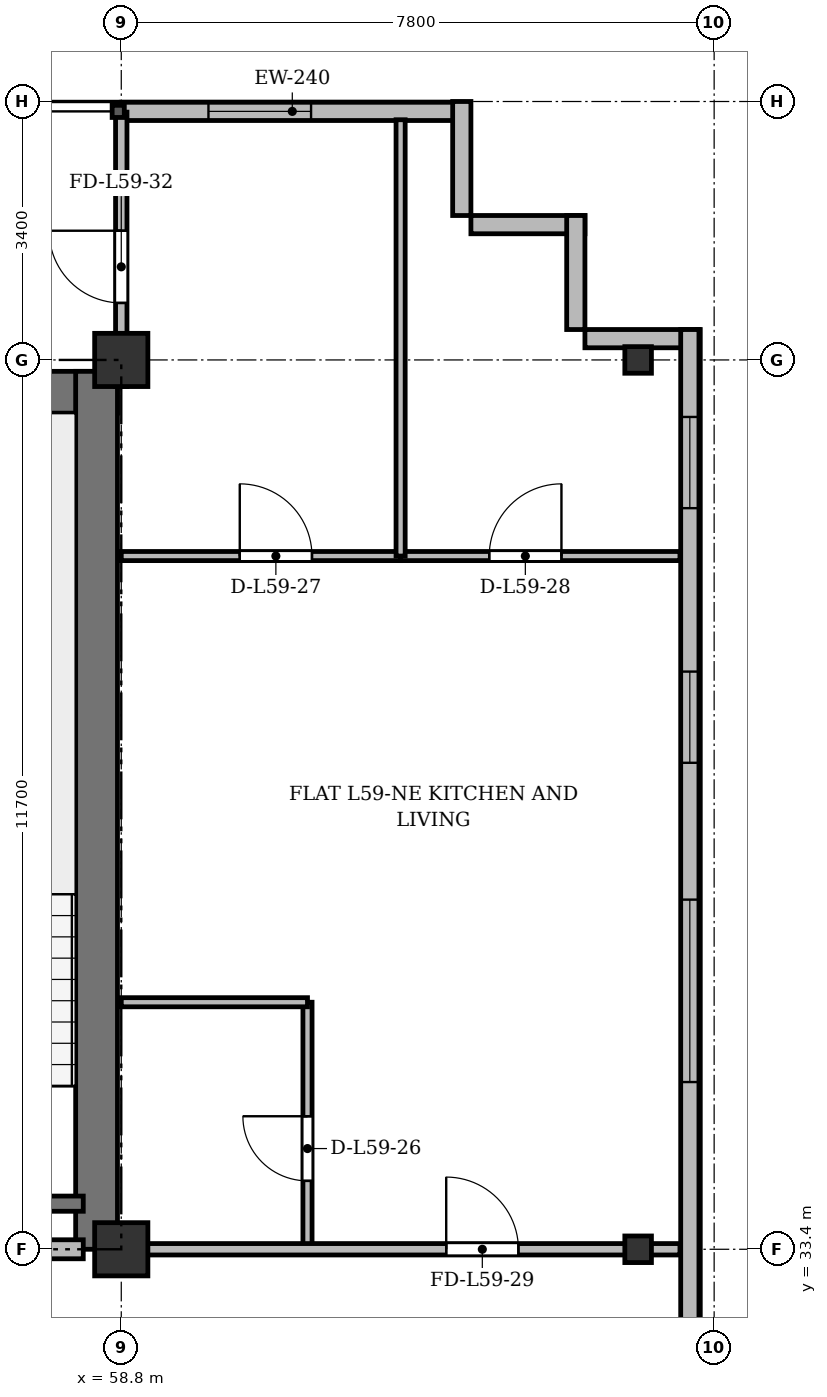
"""IFC4 building model, lengths in metres.
Left out: names, types, materials, properties, quantities, classifications, styles, units other than length and angle.
Written with IfcOpenShell. Run it as: python <this file> out.ifc"""

import sys

from ifc_helpers import new_model, si_unit, direction, frame, frame_2d, origin, origin_2d, place, context, subcontext, project, spatial, rectangle, i_section, extrude, source, transform, mapped, element, fill, save


model = new_model("IFC4")
c1 = context("Model", 3, precision=1e-05, world=origin(), true_north=direction((0.0, 1.0)))
c2 = subcontext(c1, "Body", "Model", "MODEL_VIEW")
j1 = project(units=[si_unit("LENGTHUNIT", "METRE"), si_unit("PLANEANGLEUNIT", "RADIAN")], contexts=[c1])
p1 = place(None, origin())
s1 = spatial("IfcSite", under=j1, at=p1, CompositionType="ELEMENT")
p2 = place(p1, origin())
s2 = spatial("IfcBuilding", under=s1, at=p2, CompositionType="ELEMENT")
p3 = place(p2, frame((0.0, 0.0, 226.5)))
s3 = spatial("IfcBuildingStorey", under=s2, at=p3, CompositionType="ELEMENT", Elevation=226.5)
m1 = source(origin(), c2, "Body", "SweptSolid", [
    extrude(rectangle(XDim=0.7, YDim=0.7, at=origin_2d()), origin(), (0.0, 0.0, 1.0), 3.6),
])
for number, where, z_axis, x_axis in (
    (1, (58.8, 33.4, 0.0), (0.0, 0.0, 1.0), (1.0, 0.0, 0.0)),
    (2, (58.8, 45.1, 0.0), (0.0, 0.0, 1.0), (1.0, 0.0, 0.0)),
):
    element("IfcColumn", number, at=place(p3, frame(where, z_axis=z_axis, x_axis=x_axis)), inside=s3, PredefinedType="COLUMN", context=c2, shape_type="MappedRepresentation", body=[
        mapped(m1, transform((0.0, 0.0, 0.0), x_axis=(1.0, 0.0, 0.0), y_axis=(0.0, 1.0, 0.0), z_axis=(0.0, 0.0, 1.0), scale=1.0)),
    ])
m2 = source(origin(), c2, "Body", "SweptSolid", [
    extrude(i_section(OverallWidth=0.35, OverallDepth=0.35, WebThickness=0.018, FlangeThickness=0.028, at=origin_2d()), origin(), (0.0, 0.0, 1.0), 3.6),
])
for number, where, z_axis, x_axis in (
    (3, (65.6, 33.4, 0.0), (0.0, 0.0, 1.0), (1.0, 0.0, 0.0)),
    (4, (65.6, 45.1, 0.0), (0.0, 0.0, 1.0), (1.0, 0.0, 0.0)),
):
    element("IfcColumn", number, at=place(p3, frame(where, z_axis=z_axis, x_axis=x_axis)), inside=s3, PredefinedType="COLUMN", context=c2, shape_type="MappedRepresentation", body=[
        mapped(m2, transform((0.0, 0.0, 0.0), x_axis=(1.0, 0.0, 0.0), y_axis=(0.0, 1.0, 0.0), z_axis=(0.0, 0.0, 1.0), scale=1.0)),
    ])
p4 = place(p3, frame((58.8, 48.37, 0.0), z_axis=(0.0, 0.0, 1.0), x_axis=(1.0, 0.0, 0.0)))
e5 = element("IfcWall", 5, at=p4, inside=s3, PredefinedType="SOLIDWALL", context=c2, shape_type="SweptSolid", body=[
    extrude(rectangle(XDim=4.5, YDim=0.24, at=frame_2d((2.25, 0.0))), origin(), (0.0, 0.0, 1.0), 3.36),
])
p5 = place(p4, frame((1.147, 0.0, 0.9)))
e6 = element("IfcOpeningElement", 6, at=p5, cuts=e5, PredefinedType="OPENING", context=c2, shape_type="SweptSolid", body=[
    extrude(rectangle(XDim=1.35, YDim=1.5, at=frame_2d((0.675, 0.75))), frame((0.0, 0.13, 0.0), z_axis=(0.0, -1.0, 0.0), x_axis=(1.0, 0.0, 0.0)), (0.0, 0.0, 1.0), 0.26),
])
for number, where, z_axis, x_axis in (
    (7, (63.28, 48.5, 0.0), (0.0, 0.0, 1.0), (0.0, -1.0, 0.0)),
    (8, (63.4, 46.88, 0.0), (0.0, 0.0, 1.0), (1.0, 0.0, 0.0)),
    (9, (64.78, 47.0, 0.0), (0.0, 0.0, 1.0), (0.0, -1.0, 0.0)),
    (10, (64.9, 45.38, 0.0), (0.0, 0.0, 1.0), (1.0, 0.0, 0.0)),
):
    element("IfcWall", number, at=place(p3, frame(where, z_axis=z_axis, x_axis=x_axis)), inside=s3, PredefinedType="SOLIDWALL", context=c2, shape_type="SweptSolid", body=[
        extrude(rectangle(XDim=1.5, YDim=0.24, at=frame_2d((0.75, 0.0))), origin(), (0.0, 0.0, 1.0), 3.36),
    ])
p6 = place(p3, frame((66.28, 45.5, 0.0), z_axis=(0.0, 0.0, 1.0), x_axis=(0.0, -1.0, 0.0)))
e11 = element("IfcWall", 11, at=p6, inside=s3, PredefinedType="SOLIDWALL", context=c2, shape_type="SweptSolid", body=[
    extrude(rectangle(XDim=39.1, YDim=0.24, at=frame_2d((19.55, 0.0))), origin(), (0.0, 0.0, 1.0), 3.36),
])
p7 = place(p6, frame((36.45, 0.0, 0.92)))
e12 = element("IfcOpeningElement", 12, at=p7, cuts=e11, PredefinedType="OPENING", context=c2, shape_type="SweptSolid", body=[
    extrude(rectangle(XDim=1.2, YDim=1.65, at=frame_2d((0.6, 0.825))), frame((0.0, 0.13, 0.0), z_axis=(0.0, -1.0, 0.0), x_axis=(1.0, 0.0, 0.0)), (0.0, 0.0, 1.0), 0.26),
])
p8 = place(p6, frame((32.9, 0.0, 0.92)))
e13 = element("IfcOpeningElement", 13, at=p8, cuts=e11, PredefinedType="OPENING", context=c2, shape_type="SweptSolid", body=[
    extrude(rectangle(XDim=2.4, YDim=2.1, at=frame_2d((1.2, 1.05))), frame((0.0, 0.13, 0.0), z_axis=(0.0, -1.0, 0.0), x_axis=(1.0, 0.0, 0.0)), (0.0, 0.0, 1.0), 0.26),
])
p9 = place(p6, frame((28.7, 0.0, 0.92)))
e14 = element("IfcOpeningElement", 14, at=p9, cuts=e11, PredefinedType="OPENING", context=c2, shape_type="SweptSolid", body=[
    extrude(rectangle(XDim=2.4, YDim=2.1, at=frame_2d((1.2, 1.05))), frame((0.0, 0.13, 0.0), z_axis=(0.0, -1.0, 0.0), x_axis=(1.0, 0.0, 0.0)), (0.0, 0.0, 1.0), 0.26),
])
p10 = place(p6, frame((21.5, 0.0, 0.92)))
e15 = element("IfcOpeningElement", 15, at=p10, cuts=e11, PredefinedType="OPENING", context=c2, shape_type="SweptSolid", body=[
    extrude(rectangle(XDim=2.4, YDim=2.1, at=frame_2d((1.2, 1.05))), frame((0.0, 0.13, 0.0), z_axis=(0.0, -1.0, 0.0), x_axis=(1.0, 0.0, 0.0)), (0.0, 0.0, 1.0), 0.26),
])
p11 = place(p6, frame((7.5, 0.0, 0.92)))
e16 = element("IfcOpeningElement", 16, at=p11, cuts=e11, PredefinedType="OPENING", context=c2, shape_type="SweptSolid", body=[
    extrude(rectangle(XDim=2.4, YDim=2.1, at=frame_2d((1.2, 1.05))), frame((0.0, 0.13, 0.0), z_axis=(0.0, -1.0, 0.0), x_axis=(1.0, 0.0, 0.0)), (0.0, 0.0, 1.0), 0.26),
])
p12 = place(p6, frame((4.5, 0.0, 0.92)))
e17 = element("IfcOpeningElement", 17, at=p12, cuts=e11, PredefinedType="OPENING", context=c2, shape_type="SweptSolid", body=[
    extrude(rectangle(XDim=1.2, YDim=1.65, at=frame_2d((0.6, 0.825))), frame((0.0, 0.13, 0.0), z_axis=(0.0, -1.0, 0.0), x_axis=(1.0, 0.0, 0.0)), (0.0, 0.0, 1.0), 0.26),
])
p13 = place(p6, frame((1.15, 0.0, 0.92)))
e18 = element("IfcOpeningElement", 18, at=p13, cuts=e11, PredefinedType="OPENING", context=c2, shape_type="SweptSolid", body=[
    extrude(rectangle(XDim=1.2, YDim=1.65, at=frame_2d((0.6, 0.825))), frame((0.0, 0.13, 0.0), z_axis=(0.0, -1.0, 0.0), x_axis=(1.0, 0.0, 0.0)), (0.0, 0.0, 1.0), 0.26),
])
p14 = place(p3, frame((15.65, 44.675, 0.0), z_axis=(0.0, 0.0, 1.0), x_axis=(1.0, 0.0, 0.0)))
e19 = element("IfcWall", 19, at=p14, inside=s3, PredefinedType="SHEAR", context=c2, shape_type="SweptSolid", body=[
    extrude(rectangle(XDim=43.1, YDim=0.55, at=frame_2d((21.55, 0.0))), origin(), (0.0, 0.0, 1.0), 3.36),
])
p15 = place(p3, frame((58.475, 33.4, 0.0), z_axis=(0.0, 0.0, 1.0), x_axis=(0.0, 1.0, 0.0)))
e20 = element("IfcWall", 20, at=p15, inside=s3, PredefinedType="SHEAR", context=c2, shape_type="SweptSolid", body=[
    extrude(rectangle(XDim=11.55, YDim=0.55, at=frame_2d((5.775, 0.0))), origin(), (0.0, 0.0, 1.0), 3.36),
])
p16 = place(p3, frame((54.9, 34.0, 0.0), z_axis=(0.0, 0.0, 1.0), x_axis=(1.0, 0.0, 0.0)))
e21 = element("IfcWall", 21, at=p16, inside=s3, PredefinedType="SHEAR", context=c2, shape_type="SweptSolid", body=[
    extrude(rectangle(XDim=3.4, YDim=0.2, at=frame_2d((1.7, 0.0))), origin(), (0.0, 0.0, 1.0), 3.36),
])
p17 = place(p3, frame((47.15, 33.4, 0.0), z_axis=(0.0, 0.0, 1.0), x_axis=(1.0, 0.0, 0.0)))
e22 = element("IfcWall", 22, at=p17, inside=s3, PredefinedType="PARTITIONING", context=c2, shape_type="SweptSolid", body=[
    extrude(rectangle(XDim=11.15, YDim=0.25, at=frame_2d((5.575, 0.0))), origin(), (0.0, 0.0, 1.0), 2.91),
])
p18 = place(p17, frame((0.7, 0.0, 0.0)))
e23 = element("IfcOpeningElement", 23, at=p18, cuts=e22, PredefinedType="OPENING", context=c2, shape_type="SweptSolid", body=[
    extrude(rectangle(XDim=0.95, YDim=2.15, at=frame_2d((0.475, 1.075))), frame((0.0, 0.135, 0.0), z_axis=(0.0, -1.0, 0.0), x_axis=(1.0, 0.0, 0.0)), (0.0, 0.0, 1.0), 0.27),
])
p19 = place(p17, frame((6.0, 0.0, 0.0)))
e24 = element("IfcOpeningElement", 24, at=p19, cuts=e22, PredefinedType="OPENING", context=c2, shape_type="SweptSolid", body=[
    extrude(rectangle(XDim=1.2, YDim=2.15, at=frame_2d((0.6, 1.075))), frame((0.0, 0.135, 0.0), z_axis=(0.0, -1.0, 0.0), x_axis=(1.0, 0.0, 0.0)), (0.0, 0.0, 1.0), 0.27),
])
p20 = place(p3, frame((61.25, 33.4, 0.0), z_axis=(0.0, 0.0, 1.0), x_axis=(0.0, 1.0, 0.0)))
e25 = element("IfcWall", 25, at=p20, inside=s3, PredefinedType="PARTITIONING", context=c2, shape_type="SweptSolid", body=[
    extrude(rectangle(XDim=3.25, YDim=0.12, at=frame_2d((1.625, 0.0))), origin(), (0.0, 0.0, 1.0), 2.91),
])
p21 = place(p20, frame((0.9, 0.0, 0.0)))
e26 = element("IfcOpeningElement", 26, at=p21, cuts=e25, PredefinedType="OPENING", context=c2, shape_type="SweptSolid", body=[
    extrude(rectangle(XDim=0.85, YDim=2.1, at=frame_2d((0.425, 1.05))), frame((0.0, 0.07, 0.0), z_axis=(0.0, -1.0, 0.0), x_axis=(1.0, 0.0, 0.0)), (0.0, 0.0, 1.0), 0.14),
])
p22 = place(p3, frame((58.8, 36.65, 0.0), z_axis=(0.0, 0.0, 1.0), x_axis=(1.0, 0.0, 0.0)))
e27 = element("IfcWall", 27, at=p22, inside=s3, PredefinedType="PARTITIONING", context=c2, shape_type="SweptSolid", body=[
    extrude(rectangle(XDim=2.45, YDim=0.12, at=frame_2d((1.225, 0.0))), origin(), (0.0, 0.0, 1.0), 2.86),
])
p23 = place(p3, frame((58.8, 42.52, 0.0), z_axis=(0.0, 0.0, 1.0), x_axis=(1.0, 0.0, 0.0)))
e28 = element("IfcWall", 28, at=p23, inside=s3, PredefinedType="PARTITIONING", context=c2, shape_type="SweptSolid", body=[
    extrude(rectangle(XDim=3.675, YDim=0.12, at=frame_2d((1.837, 0.0))), origin(), (0.0, 0.0, 1.0), 2.86),
])
p24 = place(p23, frame((1.559, 0.0, 0.0)))
e29 = element("IfcOpeningElement", 29, at=p24, cuts=e28, PredefinedType="OPENING", context=c2, shape_type="SweptSolid", body=[
    extrude(rectangle(XDim=0.95, YDim=2.15, at=frame_2d((0.475, 1.075))), frame((0.0, 0.07, 0.0), z_axis=(0.0, -1.0, 0.0), x_axis=(1.0, 0.0, 0.0)), (0.0, 0.0, 1.0), 0.14),
])
p25 = place(p3, frame((62.475, 42.52, 0.0), z_axis=(0.0, 0.0, 1.0), x_axis=(1.0, 0.0, 0.0)))
e30 = element("IfcWall", 30, at=p25, inside=s3, PredefinedType="PARTITIONING", context=c2, shape_type="SweptSolid", body=[
    extrude(rectangle(XDim=3.675, YDim=0.12, at=frame_2d((1.837, 0.0))), origin(), (0.0, 0.0, 1.0), 2.86),
])
p26 = place(p25, frame((1.166, 0.0, 0.0)))
e31 = element("IfcOpeningElement", 31, at=p26, cuts=e30, PredefinedType="OPENING", context=c2, shape_type="SweptSolid", body=[
    extrude(rectangle(XDim=0.95, YDim=2.15, at=frame_2d((0.475, 1.075))), frame((0.0, 0.07, 0.0), z_axis=(0.0, -1.0, 0.0), x_axis=(1.0, 0.0, 0.0)), (0.0, 0.0, 1.0), 0.14),
])
p27 = place(p3, frame((62.475, 42.52, 0.0), z_axis=(0.0, 0.0, 1.0), x_axis=(0.0, 1.0, 0.0)))
e32 = element("IfcWall", 32, at=p27, inside=s3, PredefinedType="PARTITIONING", context=c2, shape_type="SweptSolid", body=[
    extrude(rectangle(XDim=5.74, YDim=0.12, at=frame_2d((2.87, 0.0))), origin(), (0.0, 0.0, 1.0), 2.91),
])
p28 = place(p3, frame((58.8, 33.4, 0.0), z_axis=(0.0, 0.0, 1.0), x_axis=(1.0, 0.0, 0.0)))
e33 = element("IfcWall", 33, at=p28, inside=s3, PredefinedType="PARTITIONING", context=c2, shape_type="SweptSolid", body=[
    extrude(rectangle(XDim=7.35, YDim=0.15, at=frame_2d((3.675, 0.0))), origin(), (0.0, 0.0, 1.0), 2.91),
])
p29 = place(p28, frame((4.275, 0.0, 0.0)))
e34 = element("IfcOpeningElement", 34, at=p29, cuts=e33, PredefinedType="OPENING", context=c2, shape_type="SweptSolid", body=[
    extrude(rectangle(XDim=0.95, YDim=2.15, at=frame_2d((0.475, 1.075))), frame((0.0, 0.085, 0.0), z_axis=(0.0, -1.0, 0.0), x_axis=(1.0, 0.0, 0.0)), (0.0, 0.0, 1.0), 0.17),
])
p30 = place(p3, frame((58.8, 44.75, 0.0), z_axis=(0.0, 0.0, 1.0), x_axis=(0.0, 1.0, 0.0)))
e35 = element("IfcWall", 35, at=p30, inside=s3, PredefinedType="PARTITIONING", context=c2, shape_type="SweptSolid", body=[
    extrude(rectangle(XDim=3.61, YDim=0.15, at=frame_2d((1.805, 0.0))), origin(), (0.0, 0.0, 1.0), 2.86),
])
p31 = place(p30, frame((1.1, 0.0, 0.0)))
e36 = element("IfcOpeningElement", 36, at=p31, cuts=e35, PredefinedType="OPENING", context=c2, shape_type="SweptSolid", body=[
    extrude(rectangle(XDim=0.95, YDim=2.15, at=frame_2d((0.475, 1.075))), frame((0.0, 0.085, 0.0), z_axis=(0.0, -1.0, 0.0), x_axis=(1.0, 0.0, 0.0)), (0.0, 0.0, 1.0), 0.17),
])
m3 = source(origin(), c2, "Body", "SweptSolid", [
    extrude(rectangle(XDim=1.35, YDim=1.5, at=frame_2d((0.675, 0.75))), frame((0.0, 0.03, 0.0), z_axis=(0.0, -1.0, 0.0), x_axis=(1.0, 0.0, 0.0)), (0.0, 0.0, 1.0), 0.06),
])
p32 = place(p5, origin())
e37 = element("IfcWindow", 37, at=p32, inside=s3, PartitioningType="SINGLE_PANEL", PredefinedType="WINDOW", context=c2, shape_type="MappedRepresentation", body=[
    mapped(m3, transform((0.0, 0.0, 0.0), x_axis=(1.0, 0.0, 0.0), y_axis=(0.0, 1.0, 0.0), z_axis=(0.0, 0.0, 1.0), scale=1.0)),
])
fill(e6, e37)
m4 = source(origin(), c2, "Body", "SweptSolid", [
    extrude(rectangle(XDim=2.4, YDim=2.1, at=frame_2d((1.2, 1.05))), frame((0.0, 0.03, 0.0), z_axis=(0.0, -1.0, 0.0), x_axis=(1.0, 0.0, 0.0)), (0.0, 0.0, 1.0), 0.06),
])
p33 = place(p11, origin())
e38 = element("IfcWindow", 38, at=p33, inside=s3, PartitioningType="SINGLE_PANEL", PredefinedType="WINDOW", context=c2, shape_type="MappedRepresentation", body=[
    mapped(m4, transform((0.0, 0.0, 0.0), x_axis=(1.0, 0.0, 0.0), y_axis=(0.0, 1.0, 0.0), z_axis=(0.0, 0.0, 1.0), scale=1.0)),
])
fill(e16, e38)
m5 = source(origin(), c2, "Body", "SweptSolid", [
    extrude(rectangle(XDim=1.2, YDim=1.65, at=frame_2d((0.6, 0.825))), frame((0.0, 0.03, 0.0), z_axis=(0.0, -1.0, 0.0), x_axis=(1.0, 0.0, 0.0)), (0.0, 0.0, 1.0), 0.06),
])
p34 = place(p12, origin())
e39 = element("IfcWindow", 39, at=p34, inside=s3, PartitioningType="SINGLE_PANEL", PredefinedType="WINDOW", context=c2, shape_type="MappedRepresentation", body=[
    mapped(m5, transform((0.0, 0.0, 0.0), x_axis=(1.0, 0.0, 0.0), y_axis=(0.0, 1.0, 0.0), z_axis=(0.0, 0.0, 1.0), scale=1.0)),
])
fill(e17, e39)
p35 = place(p13, origin())
e40 = element("IfcWindow", 40, at=p35, inside=s3, PartitioningType="SINGLE_PANEL", PredefinedType="WINDOW", context=c2, shape_type="MappedRepresentation", body=[
    mapped(m5, transform((0.0, 0.0, 0.0), x_axis=(1.0, 0.0, 0.0), y_axis=(0.0, 1.0, 0.0), z_axis=(0.0, 0.0, 1.0), scale=1.0)),
])
fill(e18, e40)
m6 = source(origin(), c2, "Body", "SweptSolid", [
    extrude(rectangle(XDim=0.85, YDim=2.1, at=frame_2d((0.425, 1.05))), frame((0.0, 0.025, 0.0), z_axis=(0.0, -1.0, 0.0), x_axis=(1.0, 0.0, 0.0)), (0.0, 0.0, 1.0), 0.05),
])
p36 = place(p21, origin())
e41 = element("IfcDoor", 41, at=p36, inside=s3, OperationType="SINGLE_SWING_RIGHT", PredefinedType="DOOR", context=c2, shape_type="MappedRepresentation", body=[
    mapped(m6, transform((0.0, 0.0, 0.0), x_axis=(1.0, 0.0, 0.0), y_axis=(0.0, 1.0, 0.0), z_axis=(0.0, 0.0, 1.0), scale=1.0)),
])
fill(e26, e41)
m7 = source(origin(), c2, "Body", "SweptSolid", [
    extrude(rectangle(XDim=0.95, YDim=2.15, at=frame_2d((0.475, 1.075))), frame((0.0, 0.025, 0.0), z_axis=(0.0, -1.0, 0.0), x_axis=(1.0, 0.0, 0.0)), (0.0, 0.0, 1.0), 0.05),
])
p37 = place(p24, origin())
e42 = element("IfcDoor", 42, at=p37, inside=s3, OperationType="SINGLE_SWING_LEFT", PredefinedType="DOOR", context=c2, shape_type="MappedRepresentation", body=[
    mapped(m7, transform((0.0, 0.0, 0.0), x_axis=(1.0, 0.0, 0.0), y_axis=(0.0, 1.0, 0.0), z_axis=(0.0, 0.0, 1.0), scale=1.0)),
])
fill(e29, e42)
p38 = place(p26, origin())
e43 = element("IfcDoor", 43, at=p38, inside=s3, OperationType="SINGLE_SWING_RIGHT", PredefinedType="DOOR", context=c2, shape_type="MappedRepresentation", body=[
    mapped(m7, transform((0.0, 0.0, 0.0), x_axis=(1.0, 0.0, 0.0), y_axis=(0.0, 1.0, 0.0), z_axis=(0.0, 0.0, 1.0), scale=1.0)),
])
fill(e31, e43)
p39 = place(p29, origin())
e44 = element("IfcDoor", 44, at=p39, inside=s3, OperationType="SINGLE_SWING_LEFT", PredefinedType="DOOR", context=c2, shape_type="MappedRepresentation", body=[
    mapped(m7, transform((0.0, 0.0, 0.0), x_axis=(1.0, 0.0, 0.0), y_axis=(0.0, 1.0, 0.0), z_axis=(0.0, 0.0, 1.0), scale=1.0)),
])
fill(e34, e44)
p40 = place(p31, origin())
e45 = element("IfcDoor", 45, at=p40, inside=s3, OperationType="SINGLE_SWING_RIGHT", PredefinedType="DOOR", context=c2, shape_type="MappedRepresentation", body=[
    mapped(m7, transform((0.0, 0.0, 0.0), x_axis=(1.0, 0.0, 0.0), y_axis=(0.0, 1.0, 0.0), z_axis=(0.0, 0.0, 1.0), scale=1.0)),
])
fill(e36, e45)
save(model, sys.argv[1])
